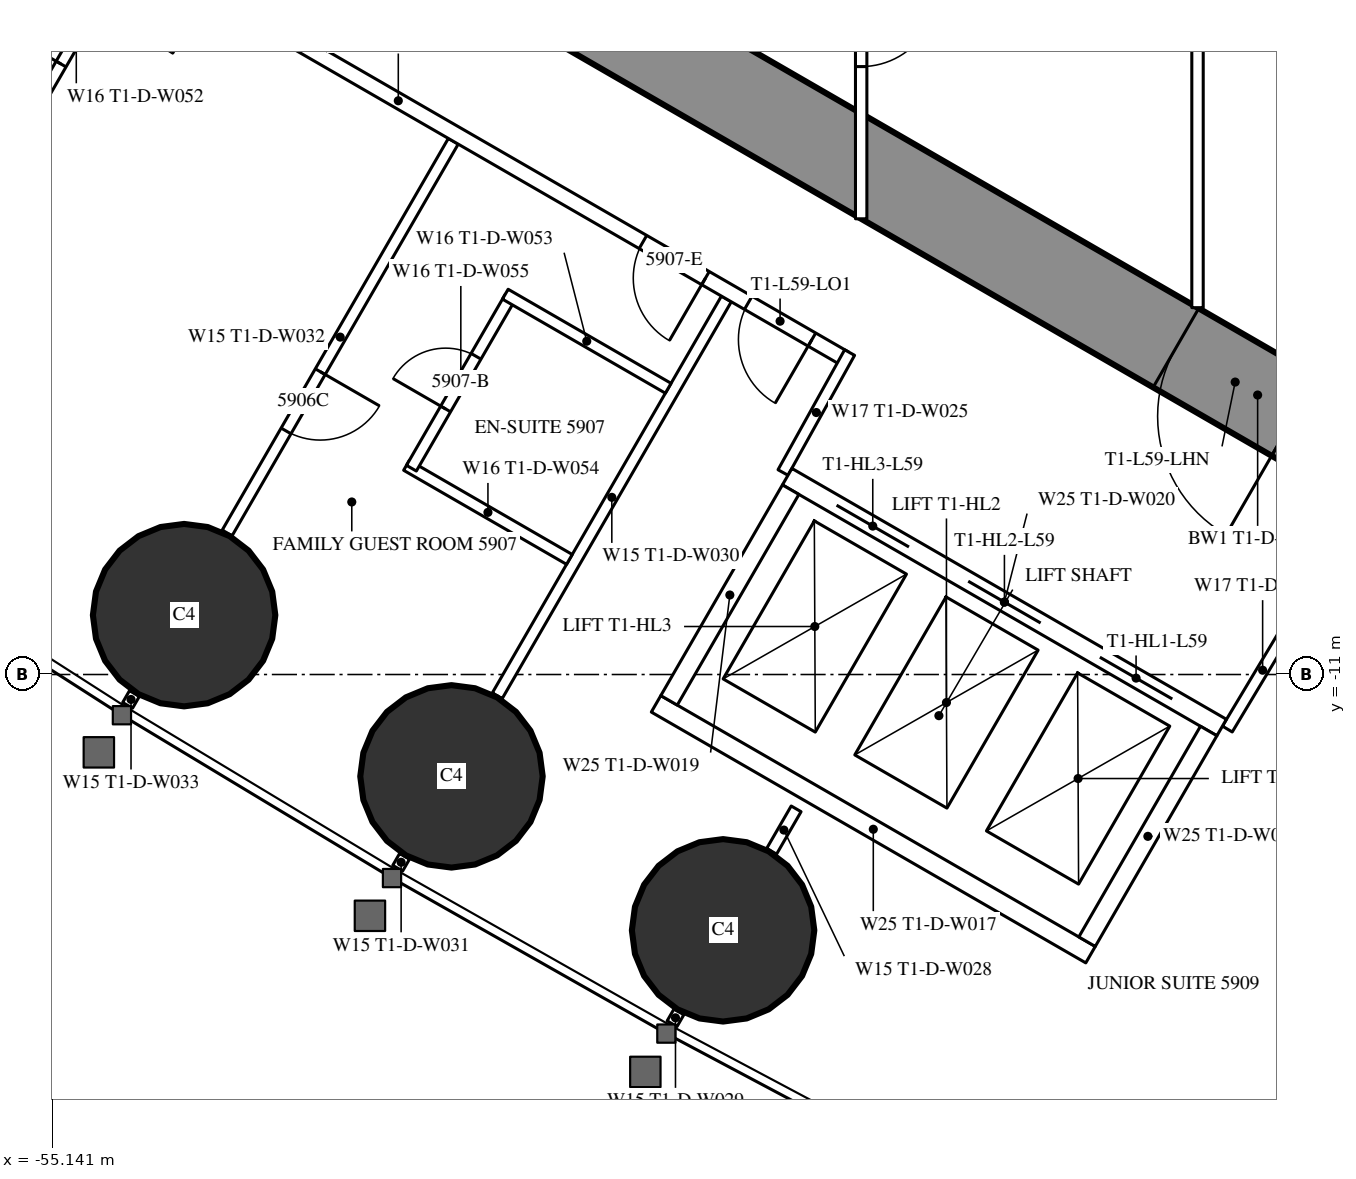
"""IFC4 building model, lengths in metres.
Left out: names, types, materials, properties, quantities, classifications, styles, units other than length and angle.
Written with IfcOpenShell. Run it as: python <this file> out.ifc"""

import sys

from ifc_helpers import new_model, si_unit, direction, frame, frame_2d, origin, origin_2d, place, context, subcontext, project, spatial, rectangle, circle, extrude, element, fill, save


model = new_model("IFC4")
c1 = context("Model", 3, precision=1e-05, world=origin(), true_north=direction((0.0, 1.0)))
c2 = subcontext(c1, "Body", "Model", "MODEL_VIEW")
j1 = project(units=[si_unit("LENGTHUNIT", "METRE"), si_unit("PLANEANGLEUNIT", "RADIAN")], contexts=[c1])
p1 = place(None, origin())
s1 = spatial("IfcSite", under=j1, at=p1, CompositionType="ELEMENT")
p2 = place(p1, origin())
s2 = spatial("IfcBuilding", under=s1, at=p2, CompositionType="ELEMENT")
p3 = place(p2, frame((0.0, 0.0, 222.5)))
s3 = spatial("IfcBuildingStorey", under=s2, at=p3, CompositionType="ELEMENT", Elevation=222.5)
for number, where, z_axis, x_axis in (
    (1, (-53.408, -10.219, 0.0), (0.0, 0.0, 1.0), (1.0, 0.0, 0.0)),
    (2, (-49.89, -12.34, 0.0), (0.0, 0.0, 1.0), (1.0, 0.0, 0.0)),
    (3, (-46.317, -14.365, 0.0), (0.0, 0.0, 1.0), (1.0, 0.0, 0.0)),
):
    element("IfcColumn", number, at=place(p3, frame(where, z_axis=z_axis, x_axis=x_axis)), inside=s3, PredefinedType="COLUMN", context=c2, shape_type="SweptSolid", body=[
        extrude(circle(Radius=1.2, at=origin_2d()), origin(), (0.0, 0.0, 1.0), 3.6),
    ])
p4 = place(p3, frame((-27.2, -14.3, 0.0), z_axis=(0.0, 0.0, 1.0), x_axis=(-0.866024021859, 0.500002393557, 0.0)))
e4 = element("IfcWall", 4, at=p4, inside=s3, PredefinedType="SHEAR", context=c2, shape_type="SweptSolid", body=[
    extrude(rectangle(XDim=27.907, YDim=1.2, at=frame_2d((13.954, 0.0))), origin(), (0.0, 0.0, 1.0), 3.6),
])
p5 = place(p4, frame((4.6, 0.0, 0.0)))
e5 = element("IfcOpeningElement", 5, at=p5, cuts=e4, PredefinedType="OPENING", context=c2, shape_type="SweptSolid", body=[
    extrude(rectangle(XDim=1.0, YDim=2.2, at=frame_2d((0.5, 1.1))), frame((0.0, 0.61, 0.0), z_axis=(0.0, -1.0, 0.0), x_axis=(1.0, 0.0, 0.0)), (0.0, 0.0, 1.0), 1.22),
])
p6 = place(p4, frame((13.395, 0.0, 0.0)))
e6 = element("IfcOpeningElement", 6, at=p6, cuts=e4, PredefinedType="OPENING", context=c2, shape_type="SweptSolid", body=[
    extrude(rectangle(XDim=1.8, YDim=2.2, at=frame_2d((0.9, 1.1))), frame((0.0, 0.61, 0.0), z_axis=(0.0, -1.0, 0.0), x_axis=(1.0, 0.0, 0.0)), (0.0, 0.0, 1.0), 1.22),
])
p7 = place(p3, frame((-46.898, -15.439, 0.0), z_axis=(0.0, 0.0, 1.0), x_axis=(-0.500232303069, -0.865891241997, 0.0)))
e7 = element("IfcWall", 7, at=p7, inside=s3, PredefinedType="PARTITIONING", context=c2, shape_type="SweptSolid", body=[
    extrude(rectangle(XDim=0.18, YDim=0.15, at=frame_2d((0.09, 0.0))), origin(), (0.0, 0.0, 1.0), 2.45),
])
p8 = place(p3, frame((-46.274, -6.059, 0.0), z_axis=(0.0, 0.0, 1.0), x_axis=(-0.500020471368, -0.866013584312, 0.0)))
e8 = element("IfcWall", 8, at=p8, inside=s3, PredefinedType="PARTITIONING", context=c2, shape_type="SweptSolid", body=[
    extrude(rectangle(XDim=6.028, YDim=0.15, at=frame_2d((3.014, 0.0))), origin(), (0.0, 0.0, 1.0), 2.45),
])
p9 = place(p3, frame((-50.508, -13.392, 0.0), z_axis=(0.0, 0.0, 1.0), x_axis=(-0.499644091975, -0.866230789891, 0.0)))
e9 = element("IfcWall", 9, at=p9, inside=s3, PredefinedType="PARTITIONING", context=c2, shape_type="SweptSolid", body=[
    extrude(rectangle(XDim=0.18, YDim=0.15, at=frame_2d((0.09, 0.0))), origin(), (0.0, 0.0, 1.0), 2.45),
])
p10 = place(p3, frame((-49.866, -3.985, 0.0), z_axis=(0.0, 0.0, 1.0), x_axis=(-0.500000694566, -0.866025002776, 0.0)))
e10 = element("IfcWall", 10, at=p10, inside=s3, PredefinedType="PARTITIONING", context=c2, shape_type="SweptSolid", body=[
    extrude(rectangle(XDim=5.95, YDim=0.15, at=frame_2d((2.975, 0.0))), origin(), (0.0, 0.0, 1.0), 2.45),
])
p11 = place(p10, frame((3.5, 0.0, 0.0)))
e11 = element("IfcOpeningElement", 11, at=p11, cuts=e10, PredefinedType="OPENING", context=c2, shape_type="SweptSolid", body=[
    extrude(rectangle(XDim=0.9, YDim=2.2, at=frame_2d((0.45, 1.1))), frame((0.0, 0.085, 0.0), z_axis=(0.0, -1.0, 0.0), x_axis=(1.0, 0.0, 0.0)), (0.0, 0.0, 1.0), 0.17),
])
p12 = place(p3, frame((-54.061, -11.25, 0.0), z_axis=(0.0, 0.0, 1.0), x_axis=(-0.500391173478, -0.865799441849, 0.0)))
e12 = element("IfcWall", 12, at=p12, inside=s3, PredefinedType="PARTITIONING", context=c2, shape_type="SweptSolid", body=[
    extrude(rectangle(XDim=0.179, YDim=0.15, at=frame_2d((0.089, 0.0))), origin(), (0.0, 0.0, 1.0), 2.45),
])
p13 = place(p3, frame((-45.356, -12.767, 0.0), z_axis=(0.0, 0.0, 1.0), x_axis=(-0.499886366516, -0.866091000168, 0.0)))
e13 = element("IfcWall", 13, at=p13, inside=s3, PredefinedType="PARTITIONING", context=c2, shape_type="SweptSolid", body=[
    extrude(rectangle(XDim=0.645, YDim=0.15, at=frame_2d((0.322, 0.0))), origin(), (0.0, 0.0, 1.0), 3.35),
])
p14 = place(p3, frame((-44.715, -6.844, 0.0), z_axis=(0.0, 0.0, 1.0), x_axis=(-0.866025261224, 0.500000246922, 0.0)))
e14 = element("IfcWall", 14, at=p14, inside=s3, PredefinedType="PARTITIONING", context=c2, shape_type="SweptSolid", body=[
    extrude(rectangle(XDim=13.567, YDim=0.2, at=frame_2d((6.783, 0.0))), origin(), (0.0, 0.0, 1.0), 3.35),
])
p15 = place(p14, frame((9.667, 0.0, 0.0)))
e15 = element("IfcOpeningElement", 15, at=p15, cuts=e14, PredefinedType="OPENING", context=c2, shape_type="SweptSolid", body=[
    extrude(rectangle(XDim=0.95, YDim=2.2, at=frame_2d((0.475, 1.1))), frame((0.0, 0.11, 0.0), z_axis=(0.0, -1.0, 0.0), x_axis=(1.0, 0.0, 0.0)), (0.0, 0.0, 1.0), 0.22),
])
p16 = place(p14, frame((2.117, 0.0, 0.0)))
e16 = element("IfcOpeningElement", 16, at=p16, cuts=e14, PredefinedType="OPENING", context=c2, shape_type="SweptSolid", body=[
    extrude(rectangle(XDim=0.95, YDim=2.2, at=frame_2d((0.475, 1.1))), frame((0.0, 0.11, 0.0), z_axis=(0.0, -1.0, 0.0), x_axis=(1.0, 0.0, 0.0)), (0.0, 0.0, 1.0), 0.22),
])
p17 = place(p14, frame((0.5, 0.0, 0.0)))
e17 = element("IfcOpeningElement", 17, at=p17, cuts=e14, PredefinedType="OPENING", context=c2, shape_type="SweptSolid", body=[
    extrude(rectangle(XDim=0.967, YDim=2.2, at=frame_2d((0.483, 1.1))), frame((0.0, 0.11, 0.0), z_axis=(0.0, -1.0, 0.0), x_axis=(1.0, 0.0, 0.0)), (0.0, 0.0, 1.0), 0.22),
])
for number, where, z_axis, x_axis in (
    (18, (-39.683, -11.718, 0.0), (0.0, 0.0, 1.0), (0.514, 0.858, 0.0)),
    (19, (-44.652, -6.764, 0.0), (0.0, 0.0, 1.0), (-0.485, -0.874, 0.0)),
):
    element("IfcWall", number, at=place(p3, frame(where, z_axis=z_axis, x_axis=x_axis)), inside=s3, PredefinedType="PARTITIONING", context=c2, shape_type="SweptSolid", body=[
        extrude(rectangle(XDim=1.805, YDim=0.15, at=frame_2d((0.903, 0.0))), origin(), (0.0, 0.0, 1.0), 3.35),
    ])
p18 = place(p3, frame((-54.176, -1.497, 0.0), z_axis=(0.0, 0.0, 1.0), x_axis=(-0.500006934395, -0.866021400173, 0.0)))
e20 = element("IfcWall", 20, at=p18, inside=s3, PredefinedType="PARTITIONING", context=c2, shape_type="SweptSolid", body=[
    extrude(rectangle(XDim=2.6, YDim=0.15, at=frame_2d((1.3, 0.0))), origin(), (0.0, 0.0, 1.0), 3.35),
])
p19 = place(p18, frame((0.9, 0.0, 0.0)))
e21 = element("IfcOpeningElement", 21, at=p19, cuts=e20, PredefinedType="OPENING", context=c2, shape_type="SweptSolid", body=[
    extrude(rectangle(XDim=0.8, YDim=2.2, at=frame_2d((0.4, 1.1))), frame((0.0, 0.085, 0.0), z_axis=(0.0, -1.0, 0.0), x_axis=(1.0, 0.0, 0.0)), (0.0, 0.0, 1.0), 0.17),
])
p20 = place(p3, frame((-48.339, -9.486, 0.0), z_axis=(0.0, 0.0, 1.0), x_axis=(-0.866006523861, 0.500032699561, 0.0)))
e22 = element("IfcWall", 22, at=p20, inside=s3, PredefinedType="PARTITIONING", context=c2, shape_type="SweptSolid", body=[
    extrude(rectangle(XDim=2.475, YDim=0.15, at=frame_2d((1.237, 0.0))), origin(), (0.0, 0.0, 1.0), 3.35),
])
p21 = place(p3, frame((-49.117, -6.034, 0.0), z_axis=(0.0, 0.0, 1.0), x_axis=(-0.500006934395, -0.866021400173, 0.0)))
e23 = element("IfcWall", 23, at=p21, inside=s3, PredefinedType="PARTITIONING", context=c2, shape_type="SweptSolid", body=[
    extrude(rectangle(XDim=2.6, YDim=0.15, at=frame_2d((1.3, 0.0))), origin(), (0.0, 0.0, 1.0), 3.35),
])
p22 = place(p21, frame((0.9, 0.0, 0.0)))
e24 = element("IfcOpeningElement", 24, at=p22, cuts=e23, PredefinedType="OPENING", context=c2, shape_type="SweptSolid", body=[
    extrude(rectangle(XDim=0.8, YDim=2.2, at=frame_2d((0.4, 1.1))), frame((0.0, 0.085, 0.0), z_axis=(0.0, -1.0, 0.0), x_axis=(1.0, 0.0, 0.0)), (0.0, 0.0, 1.0), 0.17),
])
p23 = place(p3, frame((-47.039, -7.234, 0.0), z_axis=(0.0, 0.0, 1.0), x_axis=(-0.866073894602, 0.499916002032, 0.0)))
e25 = element("IfcWall", 25, at=p23, inside=s3, PredefinedType="PARTITIONING", context=c2, shape_type="SweptSolid", body=[
    extrude(rectangle(XDim=2.475, YDim=0.15, at=frame_2d((1.238, 0.0))), origin(), (0.0, 0.0, 1.0), 2.5),
])
p24 = place(p3, frame((-40.075, 6.174, 0.0), z_axis=(0.0, 0.0, 1.0), x_axis=(0.0, -1.0, 0.0)))
e26 = element("IfcWall", 26, at=p24, inside=s3, PredefinedType="PARTITIONING", context=c2, shape_type="SweptSolid", body=[
    extrude(rectangle(XDim=12.348, YDim=0.15, at=frame_2d((6.174, 0.0))), origin(), (0.0, 0.0, 1.0), 3.35),
])
p25 = place(p24, frame((5.274, 0.0, 0.0)))
e27 = element("IfcOpeningElement", 27, at=p25, cuts=e26, PredefinedType="OPENING", context=c2, shape_type="SweptSolid", body=[
    extrude(rectangle(XDim=1.8, YDim=2.2, at=frame_2d((0.9, 1.1))), frame((0.0, 0.085, 0.0), z_axis=(0.0, -1.0, 0.0), x_axis=(1.0, 0.0, 0.0)), (0.0, 0.0, 1.0), 0.17),
])
p26 = place(p3, frame((-44.5, 5.005, 0.0), z_axis=(0.0, 0.0, 1.0), x_axis=(0.0, -1.0, 0.0)))
e28 = element("IfcWall", 28, at=p26, inside=s3, PredefinedType="PARTITIONING", context=c2, shape_type="SweptSolid", body=[
    extrude(rectangle(XDim=10.009, YDim=0.15, at=frame_2d((5.005, 0.0))), origin(), (0.0, 0.0, 1.0), 2.5),
])
p27 = place(p26, frame((2.002, 0.0, 0.0)))
e29 = element("IfcOpeningElement", 29, at=p27, cuts=e28, PredefinedType="OPENING", context=c2, shape_type="SweptSolid", body=[
    extrude(rectangle(XDim=1.0, YDim=2.2, at=frame_2d((0.5, 1.1))), frame((0.0, 0.085, 0.0), z_axis=(0.0, -1.0, 0.0), x_axis=(1.0, 0.0, 0.0)), (0.0, 0.0, 1.0), 0.17),
])
p28 = place(p26, frame((7.007, 0.0, 0.0)))
e30 = element("IfcOpeningElement", 30, at=p28, cuts=e28, PredefinedType="OPENING", context=c2, shape_type="SweptSolid", body=[
    extrude(rectangle(XDim=1.0, YDim=2.2, at=frame_2d((0.5, 1.1))), frame((0.0, 0.085, 0.0), z_axis=(0.0, -1.0, 0.0), x_axis=(1.0, 0.0, 0.0)), (0.0, 0.0, 1.0), 0.17),
])
p29 = place(p3, frame((-39.758, -11.697, 0.0), z_axis=(0.0, 0.0, 1.0), x_axis=(-0.866024194504, 0.500002094529, 0.0)))
e31 = element("IfcWall", 31, at=p29, inside=s3, PredefinedType="PARTITIONING", context=c2, shape_type="SweptSolid", body=[
    extrude(rectangle(XDim=6.6, YDim=0.25, at=frame_2d((3.3, 0.0))), origin(), (0.0, 0.0, 1.0), 3.35),
])
p30 = place(p29, frame((0.75, 0.0, 0.0)))
e32 = element("IfcOpeningElement", 32, at=p30, cuts=e31, PredefinedType="OPENING", context=c2, shape_type="SweptSolid", body=[
    extrude(rectangle(XDim=1.1, YDim=2.2, at=frame_2d((0.55, 1.1))), frame((0.0, 0.135, 0.0), z_axis=(0.0, -1.0, 0.0), x_axis=(1.0, 0.0, 0.0)), (0.0, 0.0, 1.0), 0.27),
])
p31 = place(p29, frame((2.75, 0.0, 0.0)))
e33 = element("IfcOpeningElement", 33, at=p31, cuts=e31, PredefinedType="OPENING", context=c2, shape_type="SweptSolid", body=[
    extrude(rectangle(XDim=1.1, YDim=2.2, at=frame_2d((0.55, 1.1))), frame((0.0, 0.135, 0.0), z_axis=(0.0, -1.0, 0.0), x_axis=(1.0, 0.0, 0.0)), (0.0, 0.0, 1.0), 0.27),
])
p32 = place(p29, frame((4.75, 0.0, 0.0)))
e34 = element("IfcOpeningElement", 34, at=p32, cuts=e31, PredefinedType="OPENING", context=c2, shape_type="SweptSolid", body=[
    extrude(rectangle(XDim=1.1, YDim=2.2, at=frame_2d((0.55, 1.1))), frame((0.0, 0.135, 0.0), z_axis=(0.0, -1.0, 0.0), x_axis=(1.0, 0.0, 0.0)), (0.0, 0.0, 1.0), 0.27),
])
p33 = place(p3, frame((-41.482, -14.686, 0.0), z_axis=(0.0, 0.0, 1.0), x_axis=(-0.86603344179, 0.499986077507, 0.0)))
e35 = element("IfcWall", 35, at=p33, inside=s3, PredefinedType="PARTITIONING", context=c2, shape_type="SweptSolid", body=[
    extrude(rectangle(XDim=6.6, YDim=0.25, at=frame_2d((3.3, 0.0))), origin(), (0.0, 0.0, 1.0), 3.35),
])
for number, where, z_axis, x_axis in (
    (36, (-39.928, -11.743, 0.0), (0.0, 0.0, 1.0), (-0.5, -0.866, 0.0)),
    (37, (-45.428, -8.568, 0.0), (0.0, 0.0, 1.0), (-0.5, -0.866, 0.0)),
):
    element("IfcWall", number, at=place(p3, frame(where, z_axis=z_axis, x_axis=x_axis)), inside=s3, PredefinedType="PARTITIONING", context=c2, shape_type="SweptSolid", body=[
        extrude(rectangle(XDim=3.201, YDim=0.25, at=frame_2d((1.6, 0.0))), origin(), (0.0, 0.0, 1.0), 3.35),
    ])
p34 = place(p19, origin())
e38 = element("IfcDoor", 38, at=p34, inside=s3, OperationType="SINGLE_SWING_RIGHT", PredefinedType="DOOR", context=c2, shape_type="SweptSolid", body=[
    extrude(rectangle(XDim=0.8, YDim=2.2, at=frame_2d((0.4, 1.1))), frame((0.0, 0.025, 0.0), z_axis=(0.0, -1.0, 0.0), x_axis=(1.0, 0.0, 0.0)), (0.0, 0.0, 1.0), 0.05),
])
fill(e21, e38)
p35 = place(p22, origin())
e39 = element("IfcDoor", 39, at=p35, inside=s3, OperationType="SINGLE_SWING_RIGHT", PredefinedType="DOOR", context=c2, shape_type="SweptSolid", body=[
    extrude(rectangle(XDim=0.8, YDim=2.2, at=frame_2d((0.4, 1.1))), frame((0.0, 0.025, 0.0), z_axis=(0.0, -1.0, 0.0), x_axis=(1.0, 0.0, 0.0)), (0.0, 0.0, 1.0), 0.05),
])
fill(e24, e39)
p36 = place(p16, origin())
e40 = element("IfcDoor", 40, at=p36, inside=s3, OperationType="SINGLE_SWING_LEFT", PredefinedType="DOOR", context=c2, shape_type="SweptSolid", body=[
    extrude(rectangle(XDim=0.95, YDim=2.2, at=frame_2d((0.475, 1.1))), frame((0.0, 0.025, 0.0), z_axis=(0.0, -1.0, 0.0), x_axis=(1.0, 0.0, 0.0)), (0.0, 0.0, 1.0), 0.05),
])
fill(e16, e40)
p37 = place(p17, origin())
e41 = element("IfcDoor", 41, at=p37, inside=s3, OperationType="SINGLE_SWING_LEFT", PredefinedType="DOOR", context=c2, shape_type="SweptSolid", body=[
    extrude(rectangle(XDim=0.967, YDim=2.2, at=frame_2d((0.483, 1.1))), frame((0.0, 0.025, 0.0), z_axis=(0.0, -1.0, 0.0), x_axis=(1.0, 0.0, 0.0)), (0.0, 0.0, 1.0), 0.05),
])
fill(e17, e41)
p38 = place(p11, origin())
e42 = element("IfcDoor", 42, at=p38, inside=s3, OperationType="SINGLE_SWING_LEFT", PredefinedType="DOOR", context=c2, shape_type="SweptSolid", body=[
    extrude(rectangle(XDim=0.9, YDim=2.2, at=frame_2d((0.45, 1.1))), frame((0.0, 0.025, 0.0), z_axis=(0.0, -1.0, 0.0), x_axis=(1.0, 0.0, 0.0)), (0.0, 0.0, 1.0), 0.05),
])
fill(e11, e42)
p39 = place(p28, origin())
e43 = element("IfcDoor", 43, at=p39, inside=s3, OperationType="SINGLE_SWING_LEFT", PredefinedType="DOOR", context=c2, shape_type="SweptSolid", body=[
    extrude(rectangle(XDim=1.0, YDim=2.2, at=frame_2d((0.5, 1.1))), frame((0.0, 0.025, 0.0), z_axis=(0.0, -1.0, 0.0), x_axis=(1.0, 0.0, 0.0)), (0.0, 0.0, 1.0), 0.05),
])
fill(e30, e43)
p40 = place(p6, origin())
e44 = element("IfcDoor", 44, at=p40, inside=s3, OperationType="DOUBLE_DOOR_SINGLE_SWING", PredefinedType="DOOR", context=c2, shape_type="SweptSolid", body=[
    extrude(rectangle(XDim=1.8, YDim=2.2, at=frame_2d((0.9, 1.1))), frame((0.0, 0.025, 0.0), z_axis=(0.0, -1.0, 0.0), x_axis=(1.0, 0.0, 0.0)), (0.0, 0.0, 1.0), 0.05),
])
fill(e6, e44)
p41 = place(p30, origin())
e45 = element("IfcDoor", 45, at=p41, inside=s3, OperationType="DOUBLE_DOOR_SLIDING", PredefinedType="USERDEFINED", context=c2, shape_type="SweptSolid", body=[
    extrude(rectangle(XDim=1.1, YDim=2.2, at=frame_2d((0.55, 1.1))), frame((0.0, 0.025, 0.0), z_axis=(0.0, -1.0, 0.0), x_axis=(1.0, 0.0, 0.0)), (0.0, 0.0, 1.0), 0.05),
])
fill(e32, e45)
p42 = place(p31, origin())
e46 = element("IfcDoor", 46, at=p42, inside=s3, OperationType="DOUBLE_DOOR_SLIDING", PredefinedType="USERDEFINED", context=c2, shape_type="SweptSolid", body=[
    extrude(rectangle(XDim=1.1, YDim=2.2, at=frame_2d((0.55, 1.1))), frame((0.0, 0.025, 0.0), z_axis=(0.0, -1.0, 0.0), x_axis=(1.0, 0.0, 0.0)), (0.0, 0.0, 1.0), 0.05),
])
fill(e33, e46)
p43 = place(p32, origin())
e47 = element("IfcDoor", 47, at=p43, inside=s3, OperationType="DOUBLE_DOOR_SLIDING", PredefinedType="USERDEFINED", context=c2, shape_type="SweptSolid", body=[
    extrude(rectangle(XDim=1.1, YDim=2.2, at=frame_2d((0.55, 1.1))), frame((0.0, 0.025, 0.0), z_axis=(0.0, -1.0, 0.0), x_axis=(1.0, 0.0, 0.0)), (0.0, 0.0, 1.0), 0.05),
])
fill(e34, e47)
save(model, sys.argv[1])
